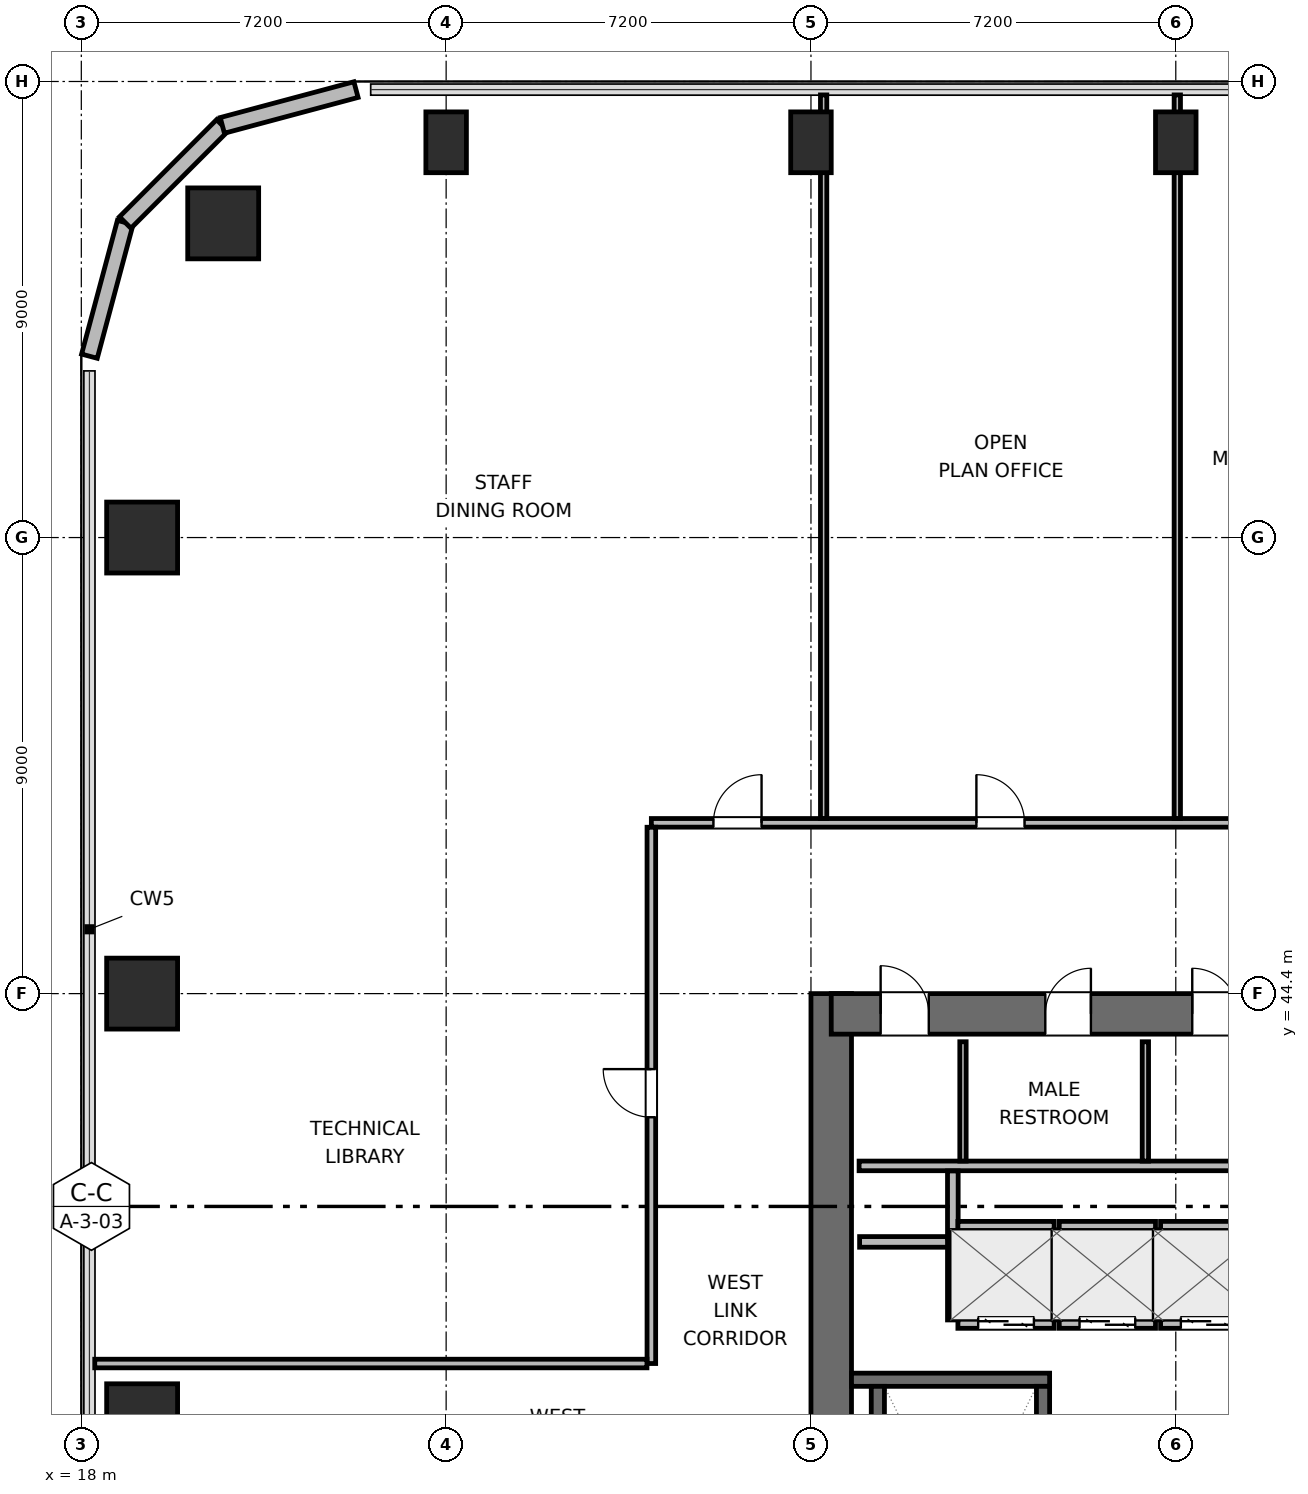
"""IFC4 building model, lengths in metres.
Left out: names, types, materials, properties, quantities, classifications, styles, units other than length and angle.
Written with IfcOpenShell. Run it as: python <this file> out.ifc"""

import sys

from ifc_helpers import new_model, si_unit, direction, frame, frame_2d, origin, origin_2d, place, context, subcontext, project, spatial, rectangle, circle, extrude, element, fill, save


model = new_model("IFC4")
c1 = context("Model", 3, precision=1e-05, world=origin(), true_north=direction((0.0, 1.0)))
c2 = subcontext(c1, "Body", "Model", "MODEL_VIEW")
j1 = project(units=[si_unit("LENGTHUNIT", "METRE"), si_unit("PLANEANGLEUNIT", "RADIAN")], contexts=[c1])
p1 = place(None, origin())
s1 = spatial("IfcSite", under=j1, at=p1, CompositionType="ELEMENT")
p2 = place(p1, origin())
s2 = spatial("IfcBuilding", under=s1, at=p2, CompositionType="ELEMENT")
p3 = place(p2, frame((0.0, 0.0, 120.9)))
s3 = spatial("IfcBuildingStorey", under=s2, at=p3, CompositionType="ELEMENT", Elevation=120.9)
p4 = place(p3, frame((32.8, 27.6, 0.0), z_axis=(0.0, 0.0, 1.0), x_axis=(0.0, 1.0, 0.0)))
e1 = element("IfcWall", 1, at=p4, inside=s3, PredefinedType="SHEAR", context=c2, shape_type="SweptSolid", body=[
    extrude(rectangle(XDim=16.8, YDim=0.8, at=frame_2d((8.4, 0.0))), origin(), (0.0, 0.0, 1.0), 4.5),
])
p5 = place(p3, frame((32.8, 44.0, 0.0), z_axis=(0.0, 0.0, 1.0), x_axis=(1.0, 0.0, 0.0)))
e2 = element("IfcWall", 2, at=p5, inside=s3, PredefinedType="SHEAR", context=c2, shape_type="SweptSolid", body=[
    extrude(rectangle(XDim=9.2, YDim=0.8, at=frame_2d((4.6, 0.0))), origin(), (0.0, 0.0, 1.0), 4.5),
])
p6 = place(p5, frame((0.975, 0.0, 0.0)))
e3 = element("IfcOpeningElement", 3, at=p6, cuts=e2, PredefinedType="OPENING", context=c2, shape_type="SweptSolid", body=[
    extrude(rectangle(XDim=0.95, YDim=2.04, at=frame_2d((0.475, 1.02))), frame((0.0, 0.41, 0.0), z_axis=(0.0, -1.0, 0.0), x_axis=(1.0, 0.0, 0.0)), (0.0, 0.0, 1.0), 0.82),
])
p7 = place(p5, frame((4.225, 0.0, 0.0)))
e4 = element("IfcOpeningElement", 4, at=p7, cuts=e2, PredefinedType="OPENING", context=c2, shape_type="SweptSolid", body=[
    extrude(rectangle(XDim=0.9, YDim=2.02, at=frame_2d((0.45, 1.01))), frame((0.0, 0.41, 0.0), z_axis=(0.0, -1.0, 0.0), x_axis=(1.0, 0.0, 0.0)), (0.0, 0.0, 1.0), 0.82),
])
p8 = place(p5, frame((7.125, 0.0, 0.0)))
e5 = element("IfcOpeningElement", 5, at=p8, cuts=e2, PredefinedType="OPENING", context=c2, shape_type="SweptSolid", body=[
    extrude(rectangle(XDim=0.9, YDim=2.02, at=frame_2d((0.45, 1.01))), frame((0.0, 0.41, 0.0), z_axis=(0.0, -1.0, 0.0), x_axis=(1.0, 0.0, 0.0)), (0.0, 0.0, 1.0), 0.82),
])
p9 = place(p3, frame((33.2, 36.78, 0.0), z_axis=(0.0, 0.0, 1.0), x_axis=(1.0, 0.0, 0.0)))
e6 = element("IfcWall", 6, at=p9, inside=s3, PredefinedType="SHEAR", context=c2, shape_type="SweptSolid", body=[
    extrude(rectangle(XDim=3.91, YDim=0.26, at=frame_2d((1.955, 0.0))), origin(), (0.0, 0.0, 1.0), 4.5),
])
p10 = place(p3, frame((33.72, 29.05, 0.0), z_axis=(0.0, 0.0, 1.0), x_axis=(0.0, 1.0, 0.0)))
e7 = element("IfcWall", 7, at=p10, inside=s3, PredefinedType="SHEAR", context=c2, shape_type="SweptSolid", body=[
    extrude(rectangle(XDim=7.6, YDim=0.26, at=frame_2d((3.8, 0.0))), origin(), (0.0, 0.0, 1.0), 4.5),
])
p11 = place(p3, frame((36.98, 29.05, 0.0), z_axis=(0.0, 0.0, 1.0), x_axis=(0.0, 1.0, 0.0)))
e8 = element("IfcWall", 8, at=p11, inside=s3, PredefinedType="SHEAR", context=c2, shape_type="SweptSolid", body=[
    extrude(rectangle(XDim=7.6, YDim=0.26, at=frame_2d((3.8, 0.0))), origin(), (0.0, 0.0, 1.0), 4.5),
])
p12 = place(p11, frame((0.3, 0.0, 0.0)))
e9 = element("IfcOpeningElement", 9, at=p12, cuts=e8, PredefinedType="OPENING", context=c2, shape_type="SweptSolid", body=[
    extrude(rectangle(XDim=1.0, YDim=2.04, at=frame_2d((0.5, 1.02))), frame((0.0, 0.14, 0.0), z_axis=(0.0, -1.0, 0.0), x_axis=(1.0, 0.0, 0.0)), (0.0, 0.0, 1.0), 0.28),
])
p13 = place(p3, frame((20.8, 59.6, 0.0), z_axis=(0.0, 0.0, 1.0), x_axis=(1.0, 0.0, 0.0)))
e10 = element("IfcColumn", 10, at=p13, inside=s3, PredefinedType="COLUMN", context=c2, shape_type="SweptSolid", body=[
    extrude(circle(Radius=0.7, at=origin_2d()), origin(), (0.0, 0.0, 1.0), 4.5),
])
for number, where, z_axis, x_axis in (
    (11, (25.2, 61.2, 0.0), (0.0, 0.0, 1.0), (1.0, 0.0, 0.0)),
    (12, (32.4, 61.2, 0.0), (0.0, 0.0, 1.0), (1.0, 0.0, 0.0)),
    (13, (39.6, 61.2, 0.0), (0.0, 0.0, 1.0), (1.0, 0.0, 0.0)),
):
    element("IfcColumn", number, at=place(p3, frame(where, z_axis=z_axis, x_axis=x_axis)), inside=s3, PredefinedType="COLUMN", context=c2, shape_type="SweptSolid", body=[
        extrude(rectangle(XDim=0.8, YDim=1.2, at=origin_2d()), origin(), (0.0, 0.0, 1.0), 4.5),
    ])
for number, where, z_axis, x_axis in (
    (14, (19.2, 36.0, 0.0), (0.0, 0.0, 1.0), (1.0, 0.0, 0.0)),
    (15, (19.2, 44.4, 0.0), (0.0, 0.0, 1.0), (1.0, 0.0, 0.0)),
    (16, (19.2, 53.4, 0.0), (0.0, 0.0, 1.0), (1.0, 0.0, 0.0)),
):
    element("IfcColumn", number, at=place(p3, frame(where, z_axis=z_axis, x_axis=x_axis)), inside=s3, PredefinedType="COLUMN", context=c2, shape_type="SweptSolid", body=[
        extrude(rectangle(XDim=1.4, YDim=1.4, at=origin_2d()), origin(), (0.0, 0.0, 1.0), 4.5),
    ])
p14 = place(p3, frame((18.16, 56.979, 0.0), z_axis=(0.0, 0.0, 1.0), x_axis=(0.25869736047, 0.965958423373, 0.0)))
e17 = element("IfcWall", 17, at=p14, inside=s3, PredefinedType="SOLIDWALL", context=c2, shape_type="SweptSolid", body=[
    extrude(rectangle(XDim=2.731, YDim=0.32, at=frame_2d((1.366, 0.0))), origin(), (0.0, 0.0, 1.0), 4.24),
])
p15 = place(p3, frame((18.866, 59.617, 0.0), z_axis=(0.0, 0.0, 1.0), x_axis=(0.707106781187, 0.707106781187, 0.0)))
e18 = element("IfcWall", 18, at=p15, inside=s3, PredefinedType="SOLIDWALL", context=c2, shape_type="SweptSolid", body=[
    extrude(rectangle(XDim=2.71, YDim=0.32, at=frame_2d((1.355, 0.0))), origin(), (0.0, 0.0, 1.0), 4.24),
])
p16 = place(p3, frame((20.783, 61.533, 0.0), z_axis=(0.0, 0.0, 1.0), x_axis=(0.965964405026, 0.25867502435, 0.0)))
e19 = element("IfcWall", 19, at=p16, inside=s3, PredefinedType="SOLIDWALL", context=c2, shape_type="SweptSolid", body=[
    extrude(rectangle(XDim=2.731, YDim=0.32, at=frame_2d((1.366, 0.0))), origin(), (0.0, 0.0, 1.0), 4.24),
])
p17 = place(p3, frame((33.35, 41.0, 0.0), z_axis=(0.0, 0.0, 1.0), x_axis=(1.0, 0.0, 0.0)))
e20 = element("IfcWall", 20, at=p17, inside=s3, PredefinedType="PLUMBINGWALL", context=c2, shape_type="SweptSolid", body=[
    extrude(rectangle(XDim=8.1, YDim=0.19, at=frame_2d((4.05, 0.0))), origin(), (0.0, 0.0, 1.0), 4.24),
])
for number, where, z_axis, x_axis in (
    (21, (35.4, 41.095, 0.0), (0.0, 0.0, 1.0), (0.0, 1.0, 0.0)),
    (22, (39.0, 41.095, 0.0), (0.0, 0.0, 1.0), (0.0, 1.0, 0.0)),
):
    element("IfcWall", number, at=place(p3, frame(where, z_axis=z_axis, x_axis=x_axis)), inside=s3, PredefinedType="PARTITIONING", context=c2, shape_type="SweptSolid", body=[
        extrude(rectangle(XDim=2.355, YDim=0.125, at=frame_2d((1.177, 0.0))), origin(), (0.0, 0.0, 1.0), 4.24),
    ])
p18 = place(p3, frame((33.36, 39.5, 0.0), z_axis=(0.0, 0.0, 1.0), x_axis=(1.0, 0.0, 0.0)))
e23 = element("IfcWall", 23, at=p18, inside=s3, PredefinedType="PARTITIONING", context=c2, shape_type="SweptSolid", body=[
    extrude(rectangle(XDim=1.86, YDim=0.21, at=frame_2d((0.93, 0.0))), origin(), (0.0, 0.0, 1.0), 4.24),
])
p19 = place(p3, frame((35.2, 39.58, 0.0), z_axis=(0.0, 0.0, 1.0), x_axis=(0.0, 1.0, 0.0)))
e24 = element("IfcWall", 24, at=p19, inside=s3, PredefinedType="PARTITIONING", context=c2, shape_type="SweptSolid", body=[
    extrude(rectangle(XDim=1.32, YDim=0.21, at=frame_2d((0.66, 0.0))), origin(), (0.0, 0.0, 1.0), 4.24),
])
p20 = place(p3, frame((35.3, 37.9, 0.0), z_axis=(0.0, 0.0, 1.0), x_axis=(1.0, 0.0, 0.0)))
e25 = element("IfcWall", 25, at=p20, inside=s3, PredefinedType="PARTITIONING", context=c2, shape_type="SweptSolid", body=[
    extrude(rectangle(XDim=1.9, YDim=0.21, at=frame_2d((0.95, 0.0))), origin(), (0.0, 0.0, 1.0), 4.24),
])
p21 = place(p20, frame((0.4, 0.0, 0.0)))
e26 = element("IfcOpeningElement", 26, at=p21, cuts=e25, PredefinedType="OPENING", context=c2, shape_type="SweptSolid", body=[
    extrude(rectangle(XDim=1.1, YDim=2.04, at=frame_2d((0.55, 1.02))), frame((0.0, 0.115, 0.0), z_axis=(0.0, -1.0, 0.0), x_axis=(1.0, 0.0, 0.0)), (0.0, 0.0, 1.0), 0.23),
])
p22 = place(p3, frame((35.3, 39.8, 0.0), z_axis=(0.0, 0.0, 1.0), x_axis=(1.0, 0.0, 0.0)))
e27 = element("IfcWall", 27, at=p22, inside=s3, PredefinedType="PARTITIONING", context=c2, shape_type="SweptSolid", body=[
    extrude(rectangle(XDim=1.9, YDim=0.21, at=frame_2d((0.95, 0.0))), origin(), (0.0, 0.0, 1.0), 4.24),
])
p23 = place(p3, frame((35.2, 37.96, 0.0), z_axis=(0.0, 0.0, 1.0), x_axis=(0.0, 1.0, 0.0)))
e28 = element("IfcWall", 28, at=p23, inside=s3, PredefinedType="PARTITIONING", context=c2, shape_type="SweptSolid", body=[
    extrude(rectangle(XDim=1.62, YDim=0.21, at=frame_2d((0.81, 0.0))), origin(), (0.0, 0.0, 1.0), 4.24),
])
p24 = place(p3, frame((37.3, 37.96, 0.0), z_axis=(0.0, 0.0, 1.0), x_axis=(0.0, 1.0, 0.0)))
e29 = element("IfcWall", 29, at=p24, inside=s3, PredefinedType="PARTITIONING", context=c2, shape_type="SweptSolid", body=[
    extrude(rectangle(XDim=1.78, YDim=0.21, at=frame_2d((0.89, 0.0))), origin(), (0.0, 0.0, 1.0), 4.24),
])
p25 = place(p3, frame((37.3, 37.9, 0.0), z_axis=(0.0, 0.0, 1.0), x_axis=(1.0, 0.0, 0.0)))
e30 = element("IfcWall", 30, at=p25, inside=s3, PredefinedType="PARTITIONING", context=c2, shape_type="SweptSolid", body=[
    extrude(rectangle(XDim=1.9, YDim=0.21, at=frame_2d((0.95, 0.0))), origin(), (0.0, 0.0, 1.0), 4.24),
])
p26 = place(p25, frame((0.4, 0.0, 0.0)))
e31 = element("IfcOpeningElement", 31, at=p26, cuts=e30, PredefinedType="OPENING", context=c2, shape_type="SweptSolid", body=[
    extrude(rectangle(XDim=1.1, YDim=2.04, at=frame_2d((0.55, 1.02))), frame((0.0, 0.115, 0.0), z_axis=(0.0, -1.0, 0.0), x_axis=(1.0, 0.0, 0.0)), (0.0, 0.0, 1.0), 0.23),
])
p27 = place(p3, frame((37.3, 39.8, 0.0), z_axis=(0.0, 0.0, 1.0), x_axis=(1.0, 0.0, 0.0)))
e32 = element("IfcWall", 32, at=p27, inside=s3, PredefinedType="PARTITIONING", context=c2, shape_type="SweptSolid", body=[
    extrude(rectangle(XDim=1.9, YDim=0.21, at=frame_2d((0.95, 0.0))), origin(), (0.0, 0.0, 1.0), 4.24),
])
p28 = place(p3, frame((39.3, 37.96, 0.0), z_axis=(0.0, 0.0, 1.0), x_axis=(0.0, 1.0, 0.0)))
e33 = element("IfcWall", 33, at=p28, inside=s3, PredefinedType="PARTITIONING", context=c2, shape_type="SweptSolid", body=[
    extrude(rectangle(XDim=1.78, YDim=0.21, at=frame_2d((0.89, 0.0))), origin(), (0.0, 0.0, 1.0), 4.24),
])
p29 = place(p3, frame((39.3, 37.9, 0.0), z_axis=(0.0, 0.0, 1.0), x_axis=(1.0, 0.0, 0.0)))
e34 = element("IfcWall", 34, at=p29, inside=s3, PredefinedType="PARTITIONING", context=c2, shape_type="SweptSolid", body=[
    extrude(rectangle(XDim=1.9, YDim=0.21, at=frame_2d((0.95, 0.0))), origin(), (0.0, 0.0, 1.0), 4.24),
])
p30 = place(p29, frame((0.4, 0.0, 0.0)))
e35 = element("IfcOpeningElement", 35, at=p30, cuts=e34, PredefinedType="OPENING", context=c2, shape_type="SweptSolid", body=[
    extrude(rectangle(XDim=1.1, YDim=2.04, at=frame_2d((0.55, 1.02))), frame((0.0, 0.115, 0.0), z_axis=(0.0, -1.0, 0.0), x_axis=(1.0, 0.0, 0.0)), (0.0, 0.0, 1.0), 0.23),
])
p31 = place(p3, frame((39.3, 39.8, 0.0), z_axis=(0.0, 0.0, 1.0), x_axis=(1.0, 0.0, 0.0)))
e36 = element("IfcWall", 36, at=p31, inside=s3, PredefinedType="PARTITIONING", context=c2, shape_type="SweptSolid", body=[
    extrude(rectangle(XDim=1.9, YDim=0.21, at=frame_2d((0.95, 0.0))), origin(), (0.0, 0.0, 1.0), 4.24),
])
p32 = place(p3, frame((29.25, 47.77, 0.0), z_axis=(0.0, 0.0, 1.0), x_axis=(1.0, 0.0, 0.0)))
e37 = element("IfcWall", 37, at=p32, inside=s3, PredefinedType="PARTITIONING", context=c2, shape_type="SweptSolid", body=[
    extrude(rectangle(XDim=34.35, YDim=0.17, at=frame_2d((17.175, 0.0))), origin(), (0.0, 0.0, 1.0), 4.24),
])
p33 = place(p32, frame((1.225, 0.0, 0.0)))
e38 = element("IfcOpeningElement", 38, at=p33, cuts=e37, PredefinedType="OPENING", context=c2, shape_type="SweptSolid", body=[
    extrude(rectangle(XDim=0.95, YDim=2.04, at=frame_2d((0.475, 1.02))), frame((0.0, 0.095, 0.0), z_axis=(0.0, -1.0, 0.0), x_axis=(1.0, 0.0, 0.0)), (0.0, 0.0, 1.0), 0.19),
])
p34 = place(p32, frame((6.415, 0.0, 0.0)))
e39 = element("IfcOpeningElement", 39, at=p34, cuts=e37, PredefinedType="OPENING", context=c2, shape_type="SweptSolid", body=[
    extrude(rectangle(XDim=0.95, YDim=2.04, at=frame_2d((0.475, 1.02))), frame((0.0, 0.095, 0.0), z_axis=(0.0, -1.0, 0.0), x_axis=(1.0, 0.0, 0.0)), (0.0, 0.0, 1.0), 0.19),
])
p35 = place(p32, frame((12.105, 0.0, 0.0)))
e40 = element("IfcOpeningElement", 40, at=p35, cuts=e37, PredefinedType="OPENING", context=c2, shape_type="SweptSolid", body=[
    extrude(rectangle(XDim=0.95, YDim=2.04, at=frame_2d((0.475, 1.02))), frame((0.0, 0.095, 0.0), z_axis=(0.0, -1.0, 0.0), x_axis=(1.0, 0.0, 0.0)), (0.0, 0.0, 1.0), 0.19),
])
p36 = place(p32, frame((17.0, 0.0, 0.0)))
e41 = element("IfcOpeningElement", 41, at=p36, cuts=e37, PredefinedType="OPENING", context=c2, shape_type="SweptSolid", body=[
    extrude(rectangle(XDim=0.95, YDim=2.04, at=frame_2d((0.475, 1.02))), frame((0.0, 0.095, 0.0), z_axis=(0.0, -1.0, 0.0), x_axis=(1.0, 0.0, 0.0)), (0.0, 0.0, 1.0), 0.19),
])
p37 = place(p32, frame((21.185, 0.0, 0.0)))
e42 = element("IfcOpeningElement", 42, at=p37, cuts=e37, PredefinedType="OPENING", context=c2, shape_type="SweptSolid", body=[
    extrude(rectangle(XDim=0.95, YDim=2.04, at=frame_2d((0.475, 1.02))), frame((0.0, 0.095, 0.0), z_axis=(0.0, -1.0, 0.0), x_axis=(1.0, 0.0, 0.0)), (0.0, 0.0, 1.0), 0.19),
])
p38 = place(p32, frame((25.78, 0.0, 0.0)))
e43 = element("IfcOpeningElement", 43, at=p38, cuts=e37, PredefinedType="OPENING", context=c2, shape_type="SweptSolid", body=[
    extrude(rectangle(XDim=0.95, YDim=2.04, at=frame_2d((0.475, 1.02))), frame((0.0, 0.095, 0.0), z_axis=(0.0, -1.0, 0.0), x_axis=(1.0, 0.0, 0.0)), (0.0, 0.0, 1.0), 0.19),
])
p39 = place(p32, frame((31.38, 0.0, 0.0)))
e44 = element("IfcOpeningElement", 44, at=p39, cuts=e37, PredefinedType="OPENING", context=c2, shape_type="SweptSolid", body=[
    extrude(rectangle(XDim=0.95, YDim=2.04, at=frame_2d((0.475, 1.02))), frame((0.0, 0.095, 0.0), z_axis=(0.0, -1.0, 0.0), x_axis=(1.0, 0.0, 0.0)), (0.0, 0.0, 1.0), 0.19),
])
p40 = place(p3, frame((29.25, 37.1, 0.0), z_axis=(0.0, 0.0, 1.0), x_axis=(0.0, 1.0, 0.0)))
e45 = element("IfcWall", 45, at=p40, inside=s3, PredefinedType="PARTITIONING", context=c2, shape_type="SweptSolid", body=[
    extrude(rectangle(XDim=10.583, YDim=0.17, at=frame_2d((5.292, 0.0))), origin(), (0.0, 0.0, 1.0), 4.24),
])
p41 = place(p40, frame((4.86, 0.0, 0.0)))
e46 = element("IfcOpeningElement", 46, at=p41, cuts=e45, PredefinedType="OPENING", context=c2, shape_type="SweptSolid", body=[
    extrude(rectangle(XDim=0.95, YDim=2.04, at=frame_2d((0.475, 1.02))), frame((0.0, 0.095, 0.0), z_axis=(0.0, -1.0, 0.0), x_axis=(1.0, 0.0, 0.0)), (0.0, 0.0, 1.0), 0.19),
])
for number, where, z_axis, x_axis in (
    (47, (32.65, 47.857, 0.0), (0.0, 0.0, 1.0), (0.0, 1.0, 0.0)),
    (48, (39.63, 47.857, 0.0), (0.0, 0.0, 1.0), (0.0, 1.0, 0.0)),
):
    element("IfcWall", number, at=place(p3, frame(where, z_axis=z_axis, x_axis=x_axis)), inside=s3, PredefinedType="PARTITIONING", context=c2, shape_type="SweptSolid", body=[
        extrude(rectangle(XDim=14.278, YDim=0.125, at=frame_2d((7.139, 0.0))), origin(), (0.0, 0.0, 1.0), 3.603),
    ])
p42 = place(p3, frame((18.265, 37.1, 0.0), z_axis=(0.0, 0.0, 1.0), x_axis=(1.0, 0.0, 0.0)))
e49 = element("IfcWall", 49, at=p42, inside=s3, PredefinedType="PARTITIONING", context=c2, shape_type="SweptSolid", body=[
    extrude(rectangle(XDim=10.898, YDim=0.17, at=frame_2d((5.449, 0.0))), origin(), (0.0, 0.0, 1.0), 4.24),
])
p43 = place(p21, origin())
e50 = element("IfcDoor", 50, at=p43, inside=s3, OperationType="DOUBLE_DOOR_SLIDING", PredefinedType="DOOR", context=c2, shape_type="SweptSolid", body=[
    extrude(rectangle(XDim=1.1, YDim=2.04, at=frame_2d((0.55, 1.02))), frame((0.0, 0.025, 0.0), z_axis=(0.0, -1.0, 0.0), x_axis=(1.0, 0.0, 0.0)), (0.0, 0.0, 1.0), 0.05),
])
fill(e26, e50)
p44 = place(p26, origin())
e51 = element("IfcDoor", 51, at=p44, inside=s3, OperationType="DOUBLE_DOOR_SLIDING", PredefinedType="DOOR", context=c2, shape_type="SweptSolid", body=[
    extrude(rectangle(XDim=1.1, YDim=2.04, at=frame_2d((0.55, 1.02))), frame((0.0, 0.025, 0.0), z_axis=(0.0, -1.0, 0.0), x_axis=(1.0, 0.0, 0.0)), (0.0, 0.0, 1.0), 0.05),
])
fill(e31, e51)
p45 = place(p30, origin())
e52 = element("IfcDoor", 52, at=p45, inside=s3, OperationType="DOUBLE_DOOR_SLIDING", PredefinedType="DOOR", context=c2, shape_type="SweptSolid", body=[
    extrude(rectangle(XDim=1.1, YDim=2.04, at=frame_2d((0.55, 1.02))), frame((0.0, 0.025, 0.0), z_axis=(0.0, -1.0, 0.0), x_axis=(1.0, 0.0, 0.0)), (0.0, 0.0, 1.0), 0.05),
])
fill(e35, e52)
p46 = place(p6, origin())
e53 = element("IfcDoor", 53, at=p46, inside=s3, OperationType="SINGLE_SWING_LEFT", PredefinedType="DOOR", context=c2, shape_type="SweptSolid", body=[
    extrude(rectangle(XDim=0.95, YDim=2.04, at=frame_2d((0.475, 1.02))), frame((0.0, 0.025, 0.0), z_axis=(0.0, -1.0, 0.0), x_axis=(1.0, 0.0, 0.0)), (0.0, 0.0, 1.0), 0.05),
])
fill(e3, e53)
p47 = place(p7, origin())
e54 = element("IfcDoor", 54, at=p47, inside=s3, OperationType="SINGLE_SWING_RIGHT", PredefinedType="DOOR", context=c2, shape_type="SweptSolid", body=[
    extrude(rectangle(XDim=0.9, YDim=2.02, at=frame_2d((0.45, 1.01))), frame((0.0, 0.025, 0.0), z_axis=(0.0, -1.0, 0.0), x_axis=(1.0, 0.0, 0.0)), (0.0, 0.0, 1.0), 0.05),
])
fill(e4, e54)
p48 = place(p8, origin())
e55 = element("IfcDoor", 55, at=p48, inside=s3, OperationType="SINGLE_SWING_LEFT", PredefinedType="DOOR", context=c2, shape_type="SweptSolid", body=[
    extrude(rectangle(XDim=0.9, YDim=2.02, at=frame_2d((0.45, 1.01))), frame((0.0, 0.025, 0.0), z_axis=(0.0, -1.0, 0.0), x_axis=(1.0, 0.0, 0.0)), (0.0, 0.0, 1.0), 0.05),
])
fill(e5, e55)
p49 = place(p33, origin())
e56 = element("IfcDoor", 56, at=p49, inside=s3, OperationType="SINGLE_SWING_RIGHT", PredefinedType="DOOR", context=c2, shape_type="SweptSolid", body=[
    extrude(rectangle(XDim=0.95, YDim=2.04, at=frame_2d((0.475, 1.02))), frame((0.0, 0.025, 0.0), z_axis=(0.0, -1.0, 0.0), x_axis=(1.0, 0.0, 0.0)), (0.0, 0.0, 1.0), 0.05),
])
fill(e38, e56)
p50 = place(p34, origin())
e57 = element("IfcDoor", 57, at=p50, inside=s3, OperationType="SINGLE_SWING_LEFT", PredefinedType="DOOR", context=c2, shape_type="SweptSolid", body=[
    extrude(rectangle(XDim=0.95, YDim=2.04, at=frame_2d((0.475, 1.02))), frame((0.0, 0.025, 0.0), z_axis=(0.0, -1.0, 0.0), x_axis=(1.0, 0.0, 0.0)), (0.0, 0.0, 1.0), 0.05),
])
fill(e39, e57)
p51 = place(p41, origin())
e58 = element("IfcDoor", 58, at=p51, inside=s3, OperationType="SINGLE_SWING_RIGHT", PredefinedType="DOOR", context=c2, shape_type="SweptSolid", body=[
    extrude(rectangle(XDim=0.95, YDim=2.04, at=frame_2d((0.475, 1.02))), frame((0.0, 0.025, 0.0), z_axis=(0.0, -1.0, 0.0), x_axis=(1.0, 0.0, 0.0)), (0.0, 0.0, 1.0), 0.05),
])
fill(e46, e58)
save(model, sys.argv[1])
